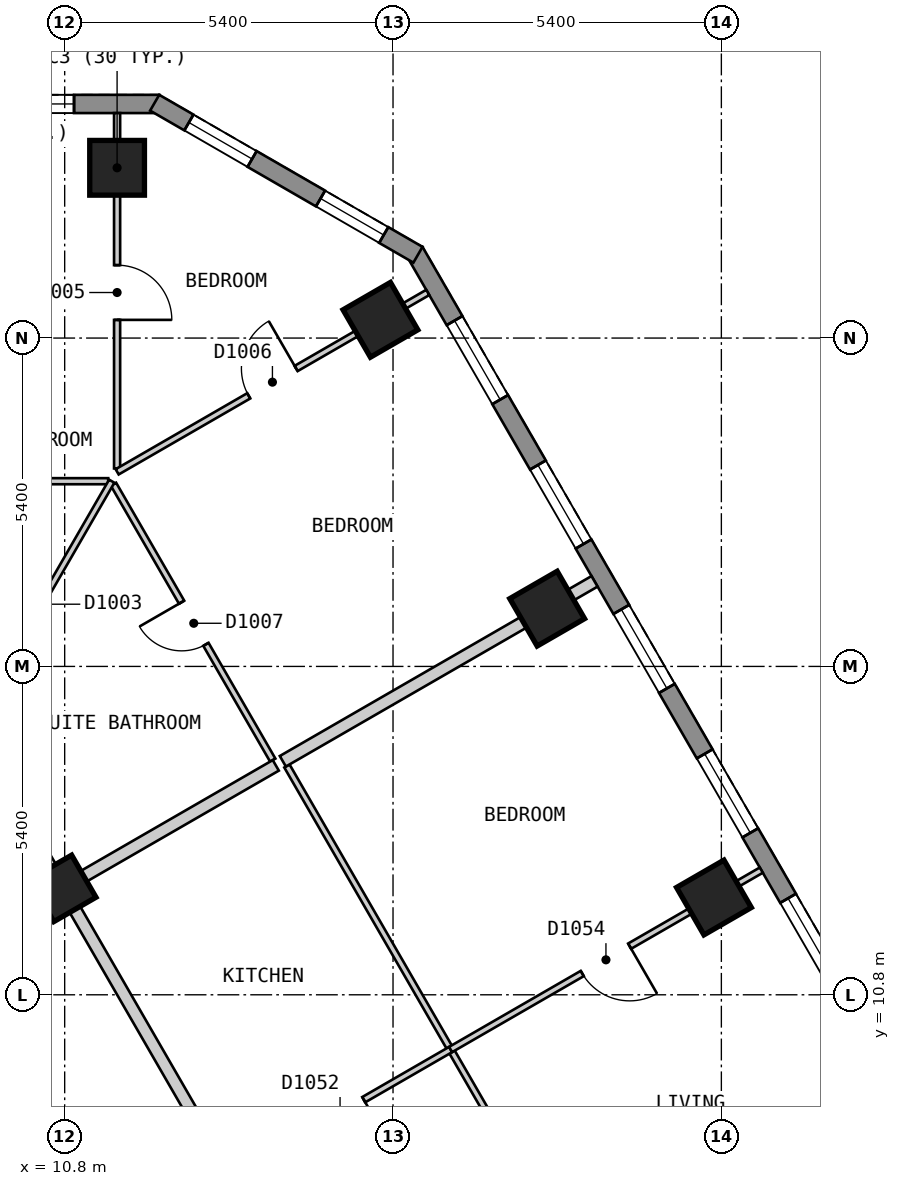
"""IFC4 building model, lengths in metres.
Left out: names, types, materials, properties, quantities, classifications, styles, units other than length and angle.
Written with IfcOpenShell. Run it as: python <this file> out.ifc"""

import sys

from ifc_helpers import new_model, si_unit, direction, frame, frame_2d, origin, origin_2d, place, context, subcontext, project, spatial, polyline, rectangle, outline, extrude, element, fill, save


model = new_model("IFC4")
c1 = context("Model", 3, precision=1e-05, world=origin(), true_north=direction((0.0, 1.0)))
c2 = subcontext(c1, "Body", "Model", "MODEL_VIEW")
j1 = project(units=[si_unit("LENGTHUNIT", "METRE"), si_unit("PLANEANGLEUNIT", "RADIAN")], contexts=[c1])
p1 = place(None, origin())
s1 = spatial("IfcSite", under=j1, at=p1, CompositionType="ELEMENT")
p2 = place(p1, origin())
s2 = spatial("IfcBuilding", under=s1, at=p2, CompositionType="ELEMENT")
p3 = place(p2, frame((0.0, 0.0, 126.6)))
s3 = spatial("IfcBuildingStorey", under=s2, at=p3, CompositionType="ELEMENT", Elevation=126.6)
for number, where, z_axis, x_axis in (
    (1, (11.662, 24.4, 0.0), (0.0, 0.0, 1.0), (-1.0, 0.0, 0.0)),
    (2, (21.478, 12.4, 0.0), (0.0, 0.0, 1.0), (-0.5, 0.866, 0.0)),
    (3, (18.735, 17.15, 0.0), (0.0, 0.0, 1.0), (-0.5, 0.866, 0.0)),
    (4, (15.993, 21.9, 0.0), (0.0, 0.0, 1.0), (-0.5, 0.866, 0.0)),
):
    element("IfcColumn", number, at=place(p3, frame(where, z_axis=z_axis, x_axis=x_axis)), inside=s3, PredefinedType="COLUMN", context=c2, shape_type="SweptSolid", body=[
        extrude(rectangle(XDim=0.9, YDim=0.9, at=origin_2d()), origin(), (0.0, 0.0, 1.0), 3.0),
    ])
p4 = place(p3, frame((10.768, 12.55, 0.0), z_axis=(0.0, 0.0, 1.0), x_axis=(-0.5, 0.866025403784, 0.0)))
e5 = element("IfcColumn", 5, at=p4, inside=s3, PredefinedType="COLUMN", context=c2, shape_type="SweptSolid", body=[
    extrude(rectangle(XDim=0.8, YDim=0.8, at=origin_2d()), origin(), (0.0, 0.0, 1.0), 3.0),
])
p5 = place(p3, frame((12.355, 25.45, 0.0), z_axis=(0.0, 0.0, 1.0), x_axis=(-1.0, 0.0, 0.0)))
e6 = element("IfcWall", 6, at=p5, inside=s3, PredefinedType="SOLIDWALL", context=c2, shape_type="SweptSolid", body=[
    extrude(outline(polyline([(0.0, -0.15), (24.71, -0.15), (24.63, 0.15), (0.08, 0.15), (0.0, -0.15)])), origin(), (0.0, 0.0, 1.0), 2.7),
])
p6 = place(p5, frame((1.401, 0.0, 0.15)))
e7 = element("IfcOpeningElement", 7, at=p6, cuts=e6, PredefinedType="OPENING", context=c2, shape_type="SweptSolid", body=[
    extrude(rectangle(XDim=1.5, YDim=2.1, at=frame_2d((0.75, 1.05))), frame((0.0, 0.16, 0.0), z_axis=(0.0, -1.0, 0.0), x_axis=(1.0, 0.0, 0.0)), (0.0, 0.0, 1.0), 0.32),
])
p7 = place(p5, frame((4.316, 0.0, 0.15)))
e8 = element("IfcOpeningElement", 8, at=p7, cuts=e6, PredefinedType="OPENING", context=c2, shape_type="SweptSolid", body=[
    extrude(rectangle(XDim=1.5, YDim=2.1, at=frame_2d((0.75, 1.05))), frame((0.0, 0.16, 0.0), z_axis=(0.0, -1.0, 0.0), x_axis=(1.0, 0.0, 0.0)), (0.0, 0.0, 1.0), 0.32),
])
p8 = place(p5, frame((7.232, 0.0, 0.15)))
e9 = element("IfcOpeningElement", 9, at=p8, cuts=e6, PredefinedType="OPENING", context=c2, shape_type="SweptSolid", body=[
    extrude(rectangle(XDim=1.5, YDim=2.1, at=frame_2d((0.75, 1.05))), frame((0.0, 0.16, 0.0), z_axis=(0.0, -1.0, 0.0), x_axis=(1.0, 0.0, 0.0)), (0.0, 0.0, 1.0), 0.32),
])
p9 = place(p5, frame((10.147, 0.0, 0.15)))
e10 = element("IfcOpeningElement", 10, at=p9, cuts=e6, PredefinedType="OPENING", context=c2, shape_type="SweptSolid", body=[
    extrude(rectangle(XDim=1.5, YDim=2.1, at=frame_2d((0.75, 1.05))), frame((0.0, 0.16, 0.0), z_axis=(0.0, -1.0, 0.0), x_axis=(1.0, 0.0, 0.0)), (0.0, 0.0, 1.0), 0.32),
])
p10 = place(p5, frame((13.063, 0.0, 0.15)))
e11 = element("IfcOpeningElement", 11, at=p10, cuts=e6, PredefinedType="OPENING", context=c2, shape_type="SweptSolid", body=[
    extrude(rectangle(XDim=1.5, YDim=2.1, at=frame_2d((0.75, 1.05))), frame((0.0, 0.16, 0.0), z_axis=(0.0, -1.0, 0.0), x_axis=(1.0, 0.0, 0.0)), (0.0, 0.0, 1.0), 0.32),
])
p11 = place(p5, frame((15.978, 0.0, 0.15)))
e12 = element("IfcOpeningElement", 12, at=p11, cuts=e6, PredefinedType="OPENING", context=c2, shape_type="SweptSolid", body=[
    extrude(rectangle(XDim=1.5, YDim=2.1, at=frame_2d((0.75, 1.05))), frame((0.0, 0.16, 0.0), z_axis=(0.0, -1.0, 0.0), x_axis=(1.0, 0.0, 0.0)), (0.0, 0.0, 1.0), 0.32),
])
p12 = place(p5, frame((18.894, 0.0, 0.15)))
e13 = element("IfcOpeningElement", 13, at=p12, cuts=e6, PredefinedType="OPENING", context=c2, shape_type="SweptSolid", body=[
    extrude(rectangle(XDim=1.5, YDim=2.1, at=frame_2d((0.75, 1.05))), frame((0.0, 0.16, 0.0), z_axis=(0.0, -1.0, 0.0), x_axis=(1.0, 0.0, 0.0)), (0.0, 0.0, 1.0), 0.32),
])
p13 = place(p5, frame((21.809, 0.0, 0.15)))
e14 = element("IfcOpeningElement", 14, at=p13, cuts=e6, PredefinedType="OPENING", context=c2, shape_type="SweptSolid", body=[
    extrude(rectangle(XDim=1.5, YDim=2.1, at=frame_2d((0.75, 1.05))), frame((0.0, 0.16, 0.0), z_axis=(0.0, -1.0, 0.0), x_axis=(1.0, 0.0, 0.0)), (0.0, 0.0, 1.0), 0.32),
])
p14 = place(p3, frame((28.218, 2.825, 0.0), z_axis=(0.0, 0.0, 1.0), x_axis=(-0.500020536353, 0.866013546791, 0.0)))
e15 = element("IfcWall", 15, at=p14, inside=s3, PredefinedType="SOLIDWALL", context=c2, shape_type="SweptSolid", body=[
    extrude(outline(polyline([(0.0, -0.15), (23.325, -0.15), (23.245, 0.15), (0.08, 0.15), (0.0, -0.15)])), origin(), (0.0, 0.0, 1.0), 2.7),
])
p15 = place(p14, frame((1.314, 0.0, 0.15)))
e16 = element("IfcOpeningElement", 16, at=p15, cuts=e15, PredefinedType="OPENING", context=c2, shape_type="SweptSolid", body=[
    extrude(rectangle(XDim=1.5, YDim=2.1, at=frame_2d((0.75, 1.05))), frame((0.0, 0.16, 0.0), z_axis=(0.0, -1.0, 0.0), x_axis=(1.0, 0.0, 0.0)), (0.0, 0.0, 1.0), 0.32),
])
p16 = place(p14, frame((4.056, 0.0, 0.15)))
e17 = element("IfcOpeningElement", 17, at=p16, cuts=e15, PredefinedType="OPENING", context=c2, shape_type="SweptSolid", body=[
    extrude(rectangle(XDim=1.5, YDim=2.1, at=frame_2d((0.75, 1.05))), frame((0.0, 0.16, 0.0), z_axis=(0.0, -1.0, 0.0), x_axis=(1.0, 0.0, 0.0)), (0.0, 0.0, 1.0), 0.32),
])
p17 = place(p14, frame((6.798, 0.0, 0.15)))
e18 = element("IfcOpeningElement", 18, at=p17, cuts=e15, PredefinedType="OPENING", context=c2, shape_type="SweptSolid", body=[
    extrude(rectangle(XDim=1.5, YDim=2.1, at=frame_2d((0.75, 1.05))), frame((0.0, 0.16, 0.0), z_axis=(0.0, -1.0, 0.0), x_axis=(1.0, 0.0, 0.0)), (0.0, 0.0, 1.0), 0.32),
])
p18 = place(p14, frame((9.541, 0.0, 0.15)))
e19 = element("IfcOpeningElement", 19, at=p18, cuts=e15, PredefinedType="OPENING", context=c2, shape_type="SweptSolid", body=[
    extrude(rectangle(XDim=1.5, YDim=2.1, at=frame_2d((0.75, 1.05))), frame((0.0, 0.16, 0.0), z_axis=(0.0, -1.0, 0.0), x_axis=(1.0, 0.0, 0.0)), (0.0, 0.0, 1.0), 0.32),
])
p19 = place(p14, frame((12.284, 0.0, 0.15)))
e20 = element("IfcOpeningElement", 20, at=p19, cuts=e15, PredefinedType="OPENING", context=c2, shape_type="SweptSolid", body=[
    extrude(rectangle(XDim=1.5, YDim=2.1, at=frame_2d((0.75, 1.05))), frame((0.0, 0.16, 0.0), z_axis=(0.0, -1.0, 0.0), x_axis=(1.0, 0.0, 0.0)), (0.0, 0.0, 1.0), 0.32),
])
p20 = place(p14, frame((15.027, 0.0, 0.15)))
e21 = element("IfcOpeningElement", 21, at=p20, cuts=e15, PredefinedType="OPENING", context=c2, shape_type="SweptSolid", body=[
    extrude(rectangle(XDim=1.5, YDim=2.1, at=frame_2d((0.75, 1.05))), frame((0.0, 0.16, 0.0), z_axis=(0.0, -1.0, 0.0), x_axis=(1.0, 0.0, 0.0)), (0.0, 0.0, 1.0), 0.32),
])
p21 = place(p14, frame((17.769, 0.0, 0.15)))
e22 = element("IfcOpeningElement", 22, at=p21, cuts=e15, PredefinedType="OPENING", context=c2, shape_type="SweptSolid", body=[
    extrude(rectangle(XDim=1.5, YDim=2.1, at=frame_2d((0.75, 1.05))), frame((0.0, 0.16, 0.0), z_axis=(0.0, -1.0, 0.0), x_axis=(1.0, 0.0, 0.0)), (0.0, 0.0, 1.0), 0.32),
])
p22 = place(p14, frame((20.511, 0.0, 0.15)))
e23 = element("IfcOpeningElement", 23, at=p22, cuts=e15, PredefinedType="OPENING", context=c2, shape_type="SweptSolid", body=[
    extrude(rectangle(XDim=1.5, YDim=2.1, at=frame_2d((0.75, 1.05))), frame((0.0, 0.16, 0.0), z_axis=(0.0, -1.0, 0.0), x_axis=(1.0, 0.0, 0.0)), (0.0, 0.0, 1.0), 0.32),
])
p23 = place(p3, frame((16.61, 22.97, 0.0), z_axis=(0.0, 0.0, 1.0), x_axis=(-0.866022959057, 0.500004234368, 0.0)))
e24 = element("IfcWall", 24, at=p23, inside=s3, PredefinedType="SOLIDWALL", context=c2, shape_type="SweptSolid", body=[
    extrude(outline(polyline([(0.0, -0.15), (5.0, -0.15), (4.92, 0.15), (0.08, 0.15), (0.0, -0.15)])), origin(), (0.0, 0.0, 1.0), 2.7),
])
p24 = place(p23, frame((0.65, 0.0, 0.15)))
e25 = element("IfcOpeningElement", 25, at=p24, cuts=e24, PredefinedType="OPENING", context=c2, shape_type="SweptSolid", body=[
    extrude(rectangle(XDim=1.2, YDim=2.1, at=frame_2d((0.6, 1.05))), frame((0.0, 0.16, 0.0), z_axis=(0.0, -1.0, 0.0), x_axis=(1.0, 0.0, 0.0)), (0.0, 0.0, 1.0), 0.32),
])
p25 = place(p23, frame((3.15, 0.0, 0.15)))
e26 = element("IfcOpeningElement", 26, at=p25, cuts=e24, PredefinedType="OPENING", context=c2, shape_type="SweptSolid", body=[
    extrude(rectangle(XDim=1.2, YDim=2.1, at=frame_2d((0.6, 1.05))), frame((0.0, 0.16, 0.0), z_axis=(0.0, -1.0, 0.0), x_axis=(1.0, 0.0, 0.0)), (0.0, 0.0, 1.0), 0.32),
])
p26 = place(p3, frame((7.967, 13.0, 0.0), z_axis=(0.0, 0.0, 1.0), x_axis=(0.50003774998, -0.866003607726, 0.0)))
e27 = element("IfcWall", 27, at=p26, inside=s3, PredefinedType="PARTITIONING", context=c2, shape_type="SweptSolid", body=[
    extrude(rectangle(XDim=14.433, YDim=0.2, at=frame_2d((7.217, 0.0))), origin(), (0.0, 0.0, 1.0), 2.7),
])
p27 = place(p26, frame((6.824, 0.0, 0.0)))
e28 = element("IfcOpeningElement", 28, at=p27, cuts=e27, PredefinedType="OPENING", context=c2, shape_type="SweptSolid", body=[
    extrude(rectangle(XDim=0.9, YDim=2.1, at=frame_2d((0.45, 1.05))), frame((0.0, 0.11, 0.0), z_axis=(0.0, -1.0, 0.0), x_axis=(1.0, 0.0, 0.0)), (0.0, 0.0, 1.0), 0.22),
])
p28 = place(p3, frame((9.296, 15.1, 0.0), z_axis=(0.0, 0.0, 1.0), x_axis=(0.499974024244, -0.866040400375, 0.0)))
e29 = element("IfcWall", 29, at=p28, inside=s3, PredefinedType="PARTITIONING", context=c2, shape_type="SweptSolid", body=[
    extrude(rectangle(XDim=16.857, YDim=0.2, at=frame_2d((8.429, 0.0))), origin(), (0.0, 0.0, 1.0), 2.7),
])
p29 = place(p28, frame((10.672, 0.0, 0.0)))
e30 = element("IfcOpeningElement", 30, at=p29, cuts=e29, PredefinedType="OPENING", context=c2, shape_type="SweptSolid", body=[
    extrude(rectangle(XDim=1.0, YDim=2.1, at=frame_2d((0.5, 1.05))), frame((0.0, 0.11, 0.0), z_axis=(0.0, -1.0, 0.0), x_axis=(1.0, 0.0, 0.0)), (0.0, 0.0, 1.0), 0.22),
])
p30 = place(p3, frame((11.603, 19.196, 0.0), z_axis=(0.0, 0.0, 1.0), x_axis=(0.499913406181, -0.866075392977, 0.0)))
e31 = element("IfcWall", 31, at=p30, inside=s3, PredefinedType="PARTITIONING", context=c2, shape_type="SweptSolid", body=[
    extrude(rectangle(XDim=5.239, YDim=0.1, at=frame_2d((2.619, 0.0))), origin(), (0.0, 0.0, 1.0), 2.7),
])
p31 = place(p30, frame((2.24, 0.0, 0.0)))
e32 = element("IfcOpeningElement", 32, at=p31, cuts=e31, PredefinedType="OPENING", context=c2, shape_type="SweptSolid", body=[
    extrude(rectangle(XDim=0.8, YDim=2.1, at=frame_2d((0.4, 1.05))), frame((0.0, 0.06, 0.0), z_axis=(0.0, -1.0, 0.0), x_axis=(1.0, 0.0, 0.0)), (0.0, 0.0, 1.0), 0.12),
])
p32 = place(p3, frame((14.455, 14.563, 0.0), z_axis=(0.0, 0.0, 1.0), x_axis=(0.500009803579, -0.866019743612, 0.0)))
e33 = element("IfcWall", 33, at=p32, inside=s3, PredefinedType="PARTITIONING", context=c2, shape_type="SweptSolid", body=[
    extrude(rectangle(XDim=16.254, YDim=0.1, at=frame_2d((8.127, 0.0))), origin(), (0.0, 0.0, 1.0), 2.7),
])
p33 = place(p32, frame((7.677, 0.0, 0.0)))
e34 = element("IfcOpeningElement", 34, at=p33, cuts=e33, PredefinedType="OPENING", context=c2, shape_type="SweptSolid", body=[
    extrude(rectangle(XDim=0.9, YDim=2.1, at=frame_2d((0.45, 1.05))), frame((0.0, 0.06, 0.0), z_axis=(0.0, -1.0, 0.0), x_axis=(1.0, 0.0, 0.0)), (0.0, 0.0, 1.0), 0.12),
])
p34 = place(p3, frame((9.033, 19.246, 0.0), z_axis=(0.0, 0.0, 1.0), x_axis=(1.0, 0.0, 0.0)))
e35 = element("IfcWall", 35, at=p34, inside=s3, PredefinedType="PARTITIONING", context=c2, shape_type="SweptSolid", body=[
    extrude(rectangle(XDim=2.483, YDim=0.1, at=frame_2d((1.242, 0.0))), origin(), (0.0, 0.0, 1.0), 2.7),
])
p35 = place(p34, frame((0.117, 0.0, 0.0)))
e36 = element("IfcOpeningElement", 36, at=p35, cuts=e35, PredefinedType="OPENING", context=c2, shape_type="SweptSolid", body=[
    extrude(rectangle(XDim=0.7, YDim=2.1, at=frame_2d((0.35, 1.05))), frame((0.0, 0.06, 0.0), z_axis=(0.0, -1.0, 0.0), x_axis=(1.0, 0.0, 0.0)), (0.0, 0.0, 1.0), 0.12),
])
p36 = place(p3, frame((9.238, 15.2, 0.0), z_axis=(0.0, 0.0, 1.0), x_axis=(0.499983303743, 0.866035043158, 0.0)))
e37 = element("IfcWall", 37, at=p36, inside=s3, PredefinedType="PARTITIONING", context=c2, shape_type="SweptSolid", body=[
    extrude(rectangle(XDim=4.672, YDim=0.1, at=frame_2d((2.336, 0.0))), origin(), (0.0, 0.0, 1.0), 2.7),
])
p37 = place(p3, frame((11.662, 19.456, 0.0), z_axis=(0.0, 0.0, 1.0), x_axis=(0.0, 1.0, 0.0)))
e38 = element("IfcWall", 38, at=p37, inside=s3, PredefinedType="PARTITIONING", context=c2, shape_type="SweptSolid", body=[
    extrude(rectangle(XDim=5.844, YDim=0.1, at=frame_2d((2.922, 0.0))), origin(), (0.0, 0.0, 1.0), 2.7),
])
p38 = place(p37, frame((2.443, 0.0, 0.0)))
e39 = element("IfcOpeningElement", 39, at=p38, cuts=e38, PredefinedType="OPENING", context=c2, shape_type="SweptSolid", body=[
    extrude(rectangle(XDim=0.9, YDim=2.1, at=frame_2d((0.45, 1.05))), frame((0.0, 0.06, 0.0), z_axis=(0.0, -1.0, 0.0), x_axis=(1.0, 0.0, 0.0)), (0.0, 0.0, 1.0), 0.12),
])
p39 = place(p3, frame((13.597, 7.85, 0.0), z_axis=(0.0, 0.0, 1.0), x_axis=(0.866006068523, 0.500033488159, 0.0)))
e40 = element("IfcWall", 40, at=p39, inside=s3, PredefinedType="PARTITIONING", context=c2, shape_type="SweptSolid", body=[
    extrude(rectangle(XDim=4.099, YDim=0.1, at=frame_2d((2.05, 0.0))), origin(), (0.0, 0.0, 1.0), 2.7),
])
p40 = place(p39, frame((1.55, 0.0, 0.0)))
e41 = element("IfcOpeningElement", 41, at=p40, cuts=e40, PredefinedType="OPENING", context=c2, shape_type="SweptSolid", body=[
    extrude(rectangle(XDim=0.9, YDim=2.1, at=frame_2d((0.45, 1.05))), frame((0.0, 0.06, 0.0), z_axis=(0.0, -1.0, 0.0), x_axis=(1.0, 0.0, 0.0)), (0.0, 0.0, 1.0), 0.12),
])
p41 = place(p3, frame((11.663, 19.4, 0.0), z_axis=(0.0, 0.0, 1.0), x_axis=(0.865941558533, 0.500145196124, 0.0)))
e42 = element("IfcWall", 42, at=p41, inside=s3, PredefinedType="PARTITIONING", context=c2, shape_type="SweptSolid", body=[
    extrude(rectangle(XDim=5.899, YDim=0.1, at=frame_2d((2.949, 0.0))), origin(), (0.0, 0.0, 1.0), 2.7),
])
p42 = place(p41, frame((2.499, 0.0, 0.0)))
e43 = element("IfcOpeningElement", 43, at=p42, cuts=e42, PredefinedType="OPENING", context=c2, shape_type="SweptSolid", body=[
    extrude(rectangle(XDim=0.9, YDim=2.1, at=frame_2d((0.45, 1.05))), frame((0.0, 0.06, 0.0), z_axis=(0.0, -1.0, 0.0), x_axis=(1.0, 0.0, 0.0)), (0.0, 0.0, 1.0), 0.12),
])
p43 = place(p3, frame((10.854, 12.6, 0.0), z_axis=(0.0, 0.0, 1.0), x_axis=(0.866076396086, 0.499911668341, 0.0)))
e44 = element("IfcWall", 44, at=p43, inside=s3, PredefinedType="PARTITIONING", context=c2, shape_type="SweptSolid", body=[
    extrude(rectangle(XDim=3.947, YDim=0.2, at=frame_2d((1.973, 0.0))), origin(), (0.0, 0.0, 1.0), 2.7),
])
p44 = place(p3, frame((14.388, 14.64, 0.0), z_axis=(0.0, 0.0, 1.0), x_axis=(0.866044090212, 0.499967632761, 0.0)))
e45 = element("IfcWall", 45, at=p44, inside=s3, PredefinedType="PARTITIONING", context=c2, shape_type="SweptSolid", body=[
    extrude(rectangle(XDim=5.919, YDim=0.2, at=frame_2d((2.959, 0.0))), origin(), (0.0, 0.0, 1.0), 2.7),
])
p45 = place(p3, frame((17.147, 9.9, 0.0), z_axis=(0.0, 0.0, 1.0), x_axis=(0.866034692906, 0.499983910424, 0.0)))
e46 = element("IfcWall", 46, at=p45, inside=s3, PredefinedType="PARTITIONING", context=c2, shape_type="SweptSolid", body=[
    extrude(rectangle(XDim=5.901, YDim=0.1, at=frame_2d((2.95, 0.0))), origin(), (0.0, 0.0, 1.0), 2.7),
])
p46 = place(p45, frame((2.5, 0.0, 0.0)))
e47 = element("IfcOpeningElement", 47, at=p46, cuts=e46, PredefinedType="OPENING", context=c2, shape_type="SweptSolid", body=[
    extrude(rectangle(XDim=0.9, YDim=2.1, at=frame_2d((0.45, 1.05))), frame((0.0, 0.06, 0.0), z_axis=(0.0, -1.0, 0.0), x_axis=(1.0, 0.0, 0.0)), (0.0, 0.0, 1.0), 0.12),
])
p47 = place(p6, origin())
e48 = element("IfcWindow", 48, at=p47, inside=s3, PartitioningType="SINGLE_PANEL", PredefinedType="WINDOW", context=c2, shape_type="SweptSolid", body=[
    extrude(rectangle(XDim=1.5, YDim=2.1, at=frame_2d((0.75, 1.05))), frame((0.0, 0.03, 0.0), z_axis=(0.0, -1.0, 0.0), x_axis=(1.0, 0.0, 0.0)), (0.0, 0.0, 1.0), 0.06),
])
fill(e7, e48)
p48 = place(p18, origin())
e49 = element("IfcWindow", 49, at=p48, inside=s3, PartitioningType="SINGLE_PANEL", PredefinedType="WINDOW", context=c2, shape_type="SweptSolid", body=[
    extrude(rectangle(XDim=1.5, YDim=2.1, at=frame_2d((0.75, 1.05))), frame((0.0, 0.03, 0.0), z_axis=(0.0, -1.0, 0.0), x_axis=(1.0, 0.0, 0.0)), (0.0, 0.0, 1.0), 0.06),
])
fill(e19, e49)
p49 = place(p19, origin())
e50 = element("IfcWindow", 50, at=p49, inside=s3, PartitioningType="SINGLE_PANEL", PredefinedType="WINDOW", context=c2, shape_type="SweptSolid", body=[
    extrude(rectangle(XDim=1.5, YDim=2.1, at=frame_2d((0.75, 1.05))), frame((0.0, 0.03, 0.0), z_axis=(0.0, -1.0, 0.0), x_axis=(1.0, 0.0, 0.0)), (0.0, 0.0, 1.0), 0.06),
])
fill(e20, e50)
p50 = place(p20, origin())
e51 = element("IfcWindow", 51, at=p50, inside=s3, PartitioningType="SINGLE_PANEL", PredefinedType="WINDOW", context=c2, shape_type="SweptSolid", body=[
    extrude(rectangle(XDim=1.5, YDim=2.1, at=frame_2d((0.75, 1.05))), frame((0.0, 0.03, 0.0), z_axis=(0.0, -1.0, 0.0), x_axis=(1.0, 0.0, 0.0)), (0.0, 0.0, 1.0), 0.06),
])
fill(e21, e51)
p51 = place(p21, origin())
e52 = element("IfcWindow", 52, at=p51, inside=s3, PartitioningType="SINGLE_PANEL", PredefinedType="WINDOW", context=c2, shape_type="SweptSolid", body=[
    extrude(rectangle(XDim=1.5, YDim=2.1, at=frame_2d((0.75, 1.05))), frame((0.0, 0.03, 0.0), z_axis=(0.0, -1.0, 0.0), x_axis=(1.0, 0.0, 0.0)), (0.0, 0.0, 1.0), 0.06),
])
fill(e22, e52)
p52 = place(p22, origin())
e53 = element("IfcWindow", 53, at=p52, inside=s3, PartitioningType="SINGLE_PANEL", PredefinedType="WINDOW", context=c2, shape_type="SweptSolid", body=[
    extrude(rectangle(XDim=1.5, YDim=2.1, at=frame_2d((0.75, 1.05))), frame((0.0, 0.03, 0.0), z_axis=(0.0, -1.0, 0.0), x_axis=(1.0, 0.0, 0.0)), (0.0, 0.0, 1.0), 0.06),
])
fill(e23, e53)
p53 = place(p24, origin())
e54 = element("IfcWindow", 54, at=p53, inside=s3, PartitioningType="SINGLE_PANEL", PredefinedType="WINDOW", context=c2, shape_type="SweptSolid", body=[
    extrude(rectangle(XDim=1.2, YDim=2.1, at=frame_2d((0.6, 1.05))), frame((0.0, 0.03, 0.0), z_axis=(0.0, -1.0, 0.0), x_axis=(1.0, 0.0, 0.0)), (0.0, 0.0, 1.0), 0.06),
])
fill(e25, e54)
p54 = place(p25, origin())
e55 = element("IfcWindow", 55, at=p54, inside=s3, PartitioningType="SINGLE_PANEL", PredefinedType="WINDOW", context=c2, shape_type="SweptSolid", body=[
    extrude(rectangle(XDim=1.2, YDim=2.1, at=frame_2d((0.6, 1.05))), frame((0.0, 0.03, 0.0), z_axis=(0.0, -1.0, 0.0), x_axis=(1.0, 0.0, 0.0)), (0.0, 0.0, 1.0), 0.06),
])
fill(e26, e55)
p55 = place(p38, origin())
e56 = element("IfcDoor", 56, at=p55, inside=s3, OperationType="SINGLE_SWING_LEFT", PredefinedType="DOOR", context=c2, shape_type="SweptSolid", body=[
    extrude(rectangle(XDim=0.9, YDim=2.1, at=frame_2d((0.45, 1.05))), frame((0.0, 0.025, 0.0), z_axis=(0.0, -1.0, 0.0), x_axis=(1.0, 0.0, 0.0)), (0.0, 0.0, 1.0), 0.05),
])
fill(e39, e56)
p56 = place(p42, origin())
e57 = element("IfcDoor", 57, at=p56, inside=s3, OperationType="SINGLE_SWING_RIGHT", PredefinedType="DOOR", context=c2, shape_type="SweptSolid", body=[
    extrude(rectangle(XDim=0.9, YDim=2.1, at=frame_2d((0.45, 1.05))), frame((0.0, 0.025, 0.0), z_axis=(0.0, -1.0, 0.0), x_axis=(1.0, 0.0, 0.0)), (0.0, 0.0, 1.0), 0.05),
])
fill(e43, e57)
p57 = place(p31, origin())
e58 = element("IfcDoor", 58, at=p57, inside=s3, OperationType="SINGLE_SWING_LEFT", PredefinedType="DOOR", context=c2, shape_type="SweptSolid", body=[
    extrude(rectangle(XDim=0.8, YDim=2.1, at=frame_2d((0.4, 1.05))), frame((0.0, 0.025, 0.0), z_axis=(0.0, -1.0, 0.0), x_axis=(1.0, 0.0, 0.0)), (0.0, 0.0, 1.0), 0.05),
])
fill(e32, e58)
p58 = place(p40, origin())
e59 = element("IfcDoor", 59, at=p58, inside=s3, OperationType="SINGLE_SWING_RIGHT", PredefinedType="DOOR", context=c2, shape_type="SweptSolid", body=[
    extrude(rectangle(XDim=0.9, YDim=2.1, at=frame_2d((0.45, 1.05))), frame((0.0, 0.025, 0.0), z_axis=(0.0, -1.0, 0.0), x_axis=(1.0, 0.0, 0.0)), (0.0, 0.0, 1.0), 0.05),
])
fill(e41, e59)
p59 = place(p46, origin())
e60 = element("IfcDoor", 60, at=p59, inside=s3, OperationType="SINGLE_SWING_RIGHT", PredefinedType="DOOR", context=c2, shape_type="SweptSolid", body=[
    extrude(rectangle(XDim=0.9, YDim=2.1, at=frame_2d((0.45, 1.05))), frame((0.0, 0.025, 0.0), z_axis=(0.0, -1.0, 0.0), x_axis=(1.0, 0.0, 0.0)), (0.0, 0.0, 1.0), 0.05),
])
fill(e47, e60)
save(model, sys.argv[1])
